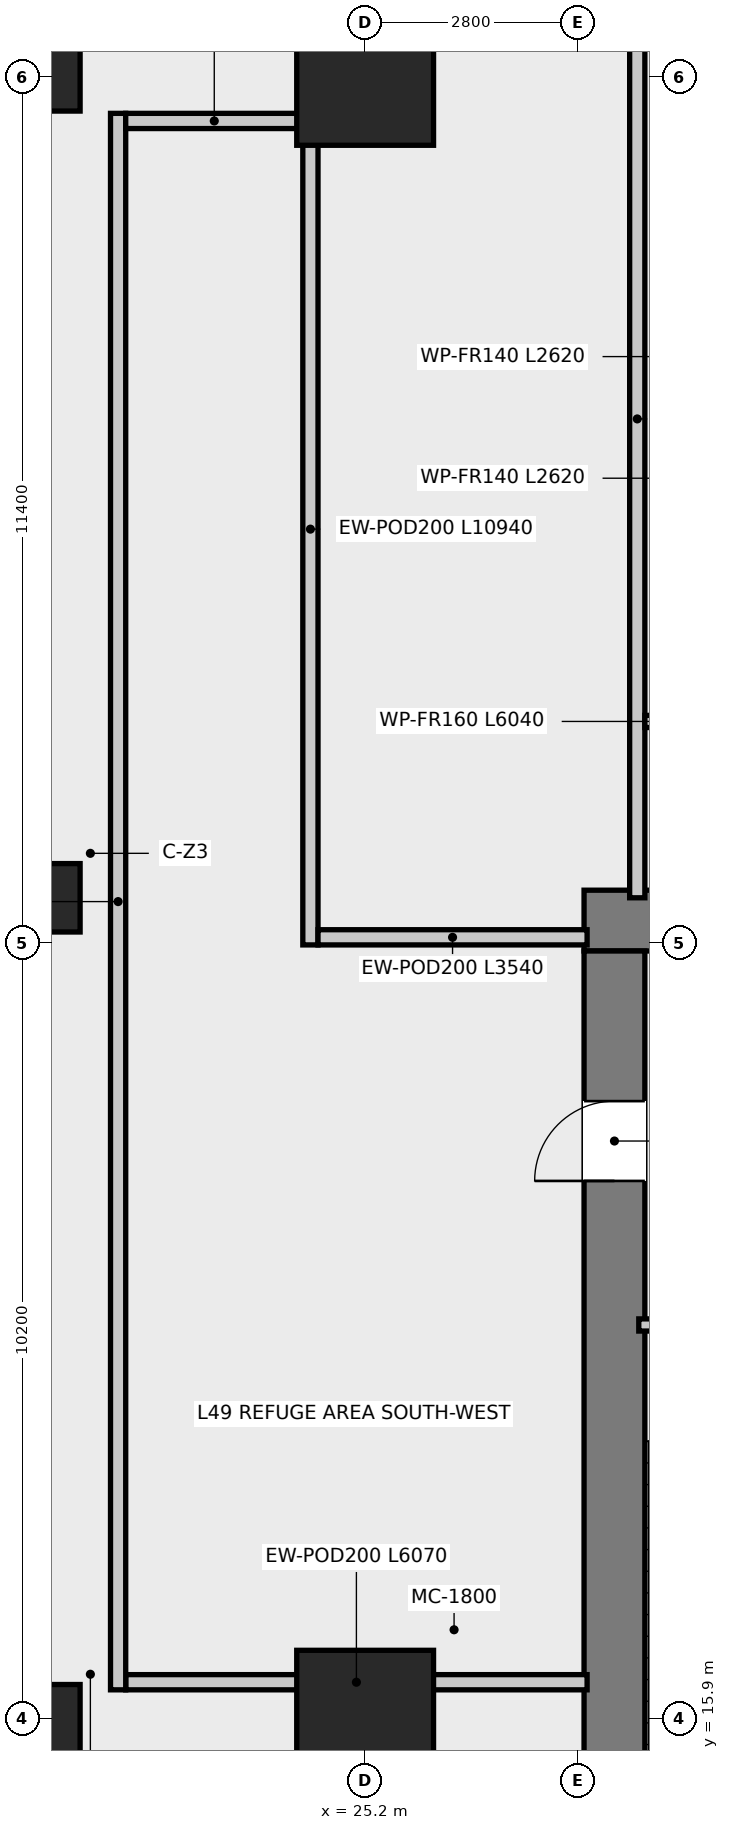
"""IFC4 building model, lengths in metres.
Left out: names, types, materials, properties, quantities, classifications, styles, units other than length and angle.
Written with IfcOpenShell. Run it as: python <this file> out.ifc"""

import sys

from ifc_helpers import new_model, si_unit, direction, frame, frame_2d, origin, origin_2d, place, context, subcontext, project, spatial, rectangle, extrude, source, transform, mapped, element, fill, save


model = new_model("IFC4")
c1 = context("Model", 3, precision=1e-05, world=origin(), true_north=direction((0.0, 1.0)))
c2 = subcontext(c1, "Body", "Model", "MODEL_VIEW")
j1 = project(units=[si_unit("LENGTHUNIT", "METRE"), si_unit("PLANEANGLEUNIT", "RADIAN")], contexts=[c1])
p1 = place(None, origin())
s1 = spatial("IfcSite", under=j1, at=p1, CompositionType="ELEMENT")
p2 = place(p1, origin())
s2 = spatial("IfcBuilding", under=s1, at=p2, CompositionType="ELEMENT")
p3 = place(p2, frame((0.0, 0.0, 201.5)))
s3 = spatial("IfcBuildingStorey", under=s2, at=p3, CompositionType="ELEMENT", Elevation=201.5)
p4 = place(p3, frame((28.08, 26.4, 0.0), z_axis=(0.0, 0.0, 1.0), x_axis=(1.0, 0.0, 0.0)))
e1 = element("IfcWall", 1, at=p4, inside=s3, PredefinedType="SHEAR", context=c2, shape_type="SweptSolid", body=[
    extrude(rectangle(XDim=15.84, YDim=0.8, at=frame_2d((7.92, 0.0))), origin(), (0.0, 0.0, 1.0), 5.8),
])
p5 = place(p4, frame((7.22, 0.0, 0.0)))
e2 = element("IfcOpeningElement", 2, at=p5, cuts=e1, PredefinedType="OPENING", context=c2, shape_type="SweptSolid", body=[
    extrude(rectangle(XDim=1.4, YDim=2.2, at=frame_2d((0.7, 1.1))), frame((0.0, 0.41, 0.0), z_axis=(0.0, -1.0, 0.0), x_axis=(1.0, 0.0, 0.0)), (0.0, 0.0, 1.0), 0.82),
])
p6 = place(p4, frame((1.775, 0.0, 0.0)))
e3 = element("IfcOpeningElement", 3, at=p6, cuts=e1, PredefinedType="OPENING", context=c2, shape_type="SweptSolid", body=[
    extrude(rectangle(XDim=1.05, YDim=2.1, at=frame_2d((0.525, 1.05))), frame((0.0, 0.41, 0.0), z_axis=(0.0, -1.0, 0.0), x_axis=(1.0, 0.0, 0.0)), (0.0, 0.0, 1.0), 0.82),
])
p7 = place(p4, frame((13.015, 0.0, 0.0)))
e4 = element("IfcOpeningElement", 4, at=p7, cuts=e1, PredefinedType="OPENING", context=c2, shape_type="SweptSolid", body=[
    extrude(rectangle(XDim=1.05, YDim=2.1, at=frame_2d((0.525, 1.05))), frame((0.0, 0.41, 0.0), z_axis=(0.0, -1.0, 0.0), x_axis=(1.0, 0.0, 0.0)), (0.0, 0.0, 1.0), 0.82),
])
p8 = place(p3, frame((28.48, 11.3, 0.0), z_axis=(0.0, 0.0, 1.0), x_axis=(0.0, 1.0, 0.0)))
e5 = element("IfcWall", 5, at=p8, inside=s3, PredefinedType="SHEAR", context=c2, shape_type="SweptSolid", body=[
    extrude(rectangle(XDim=14.7, YDim=0.8, at=frame_2d((7.35, 0.0))), origin(), (0.0, 0.0, 1.0), 5.8),
])
p9 = place(p8, frame((11.675, 0.0, 0.0)))
e6 = element("IfcOpeningElement", 6, at=p9, cuts=e5, PredefinedType="OPENING", context=c2, shape_type="SweptSolid", body=[
    extrude(rectangle(XDim=1.05, YDim=2.1, at=frame_2d((0.525, 1.05))), frame((0.0, 0.41, 0.0), z_axis=(0.0, -1.0, 0.0), x_axis=(1.0, 0.0, 0.0)), (0.0, 0.0, 1.0), 0.82),
])
m1 = source(origin(), c2, "Body", "SweptSolid", [
    extrude(rectangle(XDim=1.8, YDim=1.8, at=origin_2d()), origin(), (0.0, 0.0, 1.0), 5.8),
])
for number, where, z_axis, x_axis in (
    (7, (25.2, 15.9, 0.0), (0.0, 0.0, 1.0), (1.0, 0.0, 0.0)),
    (8, (25.2, 37.5, 0.0), (0.0, 0.0, 1.0), (1.0, 0.0, 0.0)),
):
    element("IfcColumn", number, at=place(p3, frame(where, z_axis=z_axis, x_axis=x_axis)), inside=s3, PredefinedType="USERDEFINED", context=c2, shape_type="MappedRepresentation", body=[
        mapped(m1, transform((0.0, 0.0, 0.0), x_axis=(1.0, 0.0, 0.0), y_axis=(0.0, 1.0, 0.0), z_axis=(0.0, 0.0, 1.0), scale=1.0)),
    ])
m2 = source(origin(), c2, "Body", "SweptSolid", [
    extrude(rectangle(XDim=0.9, YDim=0.9, at=origin_2d()), origin(), (0.0, 0.0, 1.0), 5.8),
])
for number, where, z_axis, x_axis in (
    (9, (21.0, 15.9, 0.0), (0.0, 0.0, 1.0), (1.0, 0.0, 0.0)),
    (10, (21.0, 26.7, 0.0), (0.0, 0.0, 1.0), (1.0, 0.0, 0.0)),
    (11, (21.0, 37.5, 0.0), (0.0, 0.0, 1.0), (1.0, 0.0, 0.0)),
):
    element("IfcColumn", number, at=place(p3, frame(where, z_axis=z_axis, x_axis=x_axis)), inside=s3, PredefinedType="COLUMN", context=c2, shape_type="MappedRepresentation", body=[
        mapped(m2, transform((0.0, 0.0, 0.0), x_axis=(1.0, 0.0, 0.0), y_axis=(0.0, 1.0, 0.0), z_axis=(0.0, 0.0, 1.0), scale=1.0)),
    ])
p10 = place(p3, frame((28.8, 21.08, 0.0), z_axis=(0.0, 0.0, 1.0), x_axis=(1.0, 0.0, 0.0)))
e12 = element("IfcWall", 12, at=p10, inside=s3, PredefinedType="PARTITIONING", context=c2, shape_type="SweptSolid", body=[
    extrude(rectangle(XDim=3.16, YDim=0.16, at=frame_2d((1.58, 0.0))), origin(), (0.0, 0.0, 1.0), 5.52),
])
p11 = place(p10, frame((1.055, 0.0, 0.0)))
e13 = element("IfcOpeningElement", 13, at=p11, cuts=e12, PredefinedType="OPENING", context=c2, shape_type="SweptSolid", body=[
    extrude(rectangle(XDim=1.05, YDim=2.1, at=frame_2d((0.525, 1.05))), frame((0.0, 0.09, 0.0), z_axis=(0.0, -1.0, 0.0), x_axis=(1.0, 0.0, 0.0)), (0.0, 0.0, 1.0), 0.18),
])
p12 = place(p3, frame((28.78, 26.7, 0.0), z_axis=(0.0, 0.0, 1.0), x_axis=(0.0, 1.0, 0.0)))
e14 = element("IfcWall", 14, at=p12, inside=s3, PredefinedType="SOLIDWALL", context=c2, shape_type="SweptSolid", body=[
    extrude(rectangle(XDim=12.6, YDim=0.2, at=frame_2d((6.3, 0.0))), origin(), (0.0, 0.0, 1.0), 4.88),
])
p13 = place(p3, frame((22.05, 16.38, 0.0), z_axis=(0.0, 0.0, 1.0), x_axis=(1.0, 0.0, 0.0)))
e15 = element("IfcWall", 15, at=p13, inside=s3, PredefinedType="SOLIDWALL", context=c2, shape_type="SweptSolid", body=[
    extrude(rectangle(XDim=6.07, YDim=0.2, at=frame_2d((3.035, 0.0))), origin(), (0.0, 0.0, 1.0), 4.88),
])
p14 = place(p3, frame((21.95, 16.28, 0.0), z_axis=(0.0, 0.0, 1.0), x_axis=(0.0, 1.0, 0.0)))
e16 = element("IfcWall", 16, at=p14, inside=s3, PredefinedType="SOLIDWALL", context=c2, shape_type="SweptSolid", body=[
    extrude(rectangle(XDim=20.74, YDim=0.2, at=frame_2d((10.37, 0.0))), origin(), (0.0, 0.0, 1.0), 4.93),
])
p15 = place(p3, frame((22.05, 36.92, 0.0), z_axis=(0.0, 0.0, 1.0), x_axis=(1.0, 0.0, 0.0)))
e17 = element("IfcWall", 17, at=p15, inside=s3, PredefinedType="SOLIDWALL", context=c2, shape_type="SweptSolid", body=[
    extrude(rectangle(XDim=2.33, YDim=0.2, at=frame_2d((1.165, 0.0))), origin(), (0.0, 0.0, 1.0), 5.52),
])
p16 = place(p3, frame((24.48, 26.08, 0.0), z_axis=(0.0, 0.0, 1.0), x_axis=(0.0, 1.0, 0.0)))
e18 = element("IfcWall", 18, at=p16, inside=s3, PredefinedType="SOLIDWALL", context=c2, shape_type="SweptSolid", body=[
    extrude(rectangle(XDim=10.94, YDim=0.2, at=frame_2d((5.47, 0.0))), origin(), (0.0, 0.0, 1.0), 4.93),
])
p17 = place(p3, frame((24.58, 26.18, 0.0), z_axis=(0.0, 0.0, 1.0), x_axis=(1.0, 0.0, 0.0)))
e19 = element("IfcWall", 19, at=p17, inside=s3, PredefinedType="SOLIDWALL", context=c2, shape_type="SweptSolid", body=[
    extrude(rectangle(XDim=3.54, YDim=0.2, at=frame_2d((1.77, 0.0))), origin(), (0.0, 0.0, 1.0), 4.88),
])
p18 = place(p3, frame((28.88, 29.02, 0.0), z_axis=(0.0, 0.0, 1.0), x_axis=(1.0, 0.0, 0.0)))
e20 = element("IfcWall", 20, at=p18, inside=s3, PredefinedType="PARTITIONING", context=c2, shape_type="SweptSolid", body=[
    extrude(rectangle(XDim=6.04, YDim=0.16, at=frame_2d((3.02, 0.0))), origin(), (0.0, 0.0, 1.0), 4.93),
])
p19 = place(p18, frame((1.145, 0.0, 0.0)))
e21 = element("IfcOpeningElement", 21, at=p19, cuts=e20, PredefinedType="OPENING", context=c2, shape_type="SweptSolid", body=[
    extrude(rectangle(XDim=1.05, YDim=2.1, at=frame_2d((0.525, 1.05))), frame((0.0, 0.09, 0.0), z_axis=(0.0, -1.0, 0.0), x_axis=(1.0, 0.0, 0.0)), (0.0, 0.0, 1.0), 0.18),
])
p20 = place(p9, origin())
e22 = element("IfcDoor", 22, at=p20, inside=s3, OperationType="SINGLE_SWING_LEFT", PredefinedType="DOOR", context=c2, shape_type="SweptSolid", body=[
    extrude(rectangle(XDim=1.05, YDim=2.1, at=frame_2d((0.525, 1.05))), frame((0.0, 0.025, 0.0), z_axis=(0.0, -1.0, 0.0), x_axis=(1.0, 0.0, 0.0)), (0.0, 0.0, 1.0), 0.05),
])
fill(e6, e22)
save(model, sys.argv[1])
